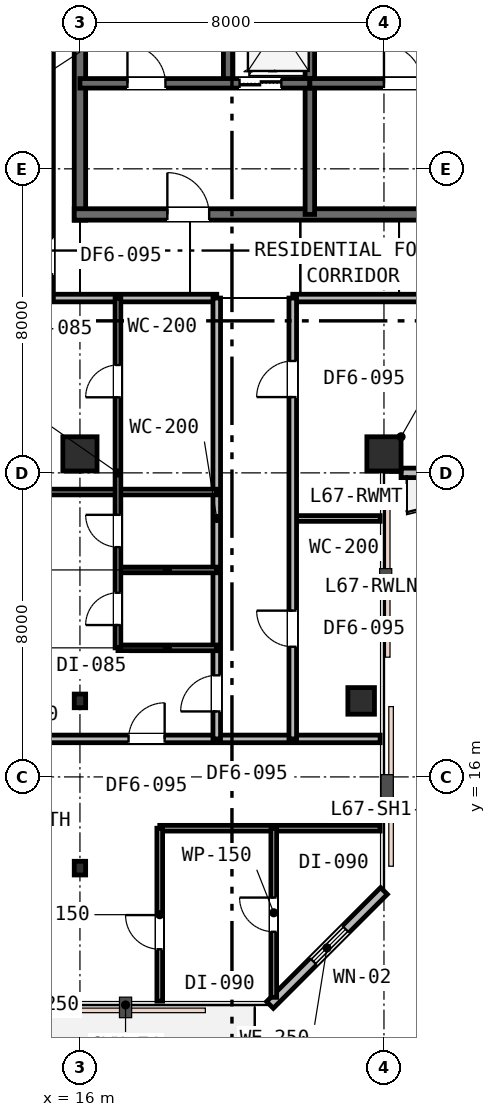
"""IFC4 building model, lengths in metres.
Left out: names, types, materials, properties, quantities, classifications, styles, units other than length and angle.
Written with IfcOpenShell. Run it as: python <this file> out.ifc"""

import sys

from ifc_helpers import new_model, si_unit, direction, frame, frame_2d, origin, origin_2d, place, context, subcontext, project, spatial, rectangle, i_section, extrude, element, fill, save


model = new_model("IFC4")
c1 = context("Model", 3, precision=1e-05, world=origin(), true_north=direction((0.0, 1.0)))
c2 = subcontext(c1, "Body", "Model", "MODEL_VIEW")
j1 = project(units=[si_unit("LENGTHUNIT", "METRE"), si_unit("PLANEANGLEUNIT", "RADIAN")], contexts=[c1])
p1 = place(None, origin())
s1 = spatial("IfcSite", under=j1, at=p1, CompositionType="ELEMENT")
p2 = place(p1, origin())
s2 = spatial("IfcBuilding", under=s1, at=p2, CompositionType="ELEMENT")
p3 = place(p2, frame((0.0, 0.0, 260.2)))
s3 = spatial("IfcBuildingStorey", under=s2, at=p3, CompositionType="ELEMENT", Elevation=260.2)
p4 = place(p3, frame((16.0, 30.65, 0.0), z_axis=(0.0, 0.0, 1.0), x_axis=(0.0, 1.0, 0.0)))
e1 = element("IfcWall", 1, at=p4, inside=s3, PredefinedType="SHEAR", context=c2, shape_type="SweptSolid", body=[
    extrude(rectangle(XDim=12.3, YDim=0.3, at=frame_2d((6.15, 0.0))), origin(), (0.0, 0.0, 1.0), 3.8),
])
p5 = place(p3, frame((15.85, 30.8, 0.0), z_axis=(0.0, 0.0, 1.0), x_axis=(1.0, 0.0, 0.0)))
e2 = element("IfcWall", 2, at=p5, inside=s3, PredefinedType="SHEAR", context=c2, shape_type="SweptSolid", body=[
    extrude(rectangle(XDim=11.2, YDim=0.3, at=frame_2d((5.6, 0.0))), origin(), (0.0, 0.0, 1.0), 3.8),
])
p6 = place(p5, frame((2.45, 0.0, 0.0)))
e3 = element("IfcOpeningElement", 3, at=p6, cuts=e2, PredefinedType="OPENING", context=c2, shape_type="SweptSolid", body=[
    extrude(rectangle(XDim=1.1, YDim=2.15, at=frame_2d((0.55, 1.075))), frame((0.0, 0.16, 0.0), z_axis=(0.0, -1.0, 0.0), x_axis=(1.0, 0.0, 0.0)), (0.0, 0.0, 1.0), 0.32),
])
p7 = place(p3, frame((19.9, 34.25, 0.0), z_axis=(0.0, 0.0, 1.0), x_axis=(0.0, 1.0, 0.0)))
e4 = element("IfcWall", 4, at=p7, inside=s3, PredefinedType="SHEAR", context=c2, shape_type="SweptSolid", body=[
    extrude(rectangle(XDim=8.65, YDim=0.25, at=frame_2d((4.325, 0.0))), origin(), (0.0, 0.0, 1.0), 3.8),
])
p8 = place(p3, frame((22.05, 30.8, 0.0), z_axis=(0.0, 0.0, 1.0), x_axis=(0.0, 1.0, 0.0)))
e5 = element("IfcWall", 5, at=p8, inside=s3, PredefinedType="SHEAR", context=c2, shape_type="SweptSolid", body=[
    extrude(rectangle(XDim=6.45, YDim=0.25, at=frame_2d((3.225, 0.0))), origin(), (0.0, 0.0, 1.0), 3.8),
])
p9 = place(p3, frame((16.0, 34.25, 0.0), z_axis=(0.0, 0.0, 1.0), x_axis=(1.0, 0.0, 0.0)))
e6 = element("IfcWall", 6, at=p9, inside=s3, PredefinedType="SHEAR", context=c2, shape_type="SweptSolid", body=[
    extrude(rectangle(XDim=6.05, YDim=0.25, at=frame_2d((3.025, 0.0))), origin(), (0.0, 0.0, 1.0), 3.8),
])
p10 = place(p9, frame((1.25, 0.0, 0.0)))
e7 = element("IfcOpeningElement", 7, at=p10, cuts=e6, PredefinedType="OPENING", context=c2, shape_type="SweptSolid", body=[
    extrude(rectangle(XDim=1.0, YDim=2.15, at=frame_2d((0.5, 1.075))), frame((0.0, 0.135, 0.0), z_axis=(0.0, -1.0, 0.0), x_axis=(1.0, 0.0, 0.0)), (0.0, 0.0, 1.0), 0.27),
])
p11 = place(p9, frame((4.2, 0.0, 0.0)))
e8 = element("IfcOpeningElement", 8, at=p11, cuts=e6, PredefinedType="OPENING", context=c2, shape_type="SweptSolid", body=[
    extrude(rectangle(XDim=1.1, YDim=2.15, at=frame_2d((0.55, 1.075))), frame((0.0, 0.135, 0.0), z_axis=(0.0, -1.0, 0.0), x_axis=(1.0, 0.0, 0.0)), (0.0, 0.0, 1.0), 0.27),
])
p12 = place(p3, frame((22.05, 34.25, 0.0), z_axis=(0.0, 0.0, 1.0), x_axis=(1.0, 0.0, 0.0)))
e9 = element("IfcWall", 9, at=p12, inside=s3, PredefinedType="SHEAR", context=c2, shape_type="SweptSolid", body=[
    extrude(rectangle(XDim=5.0, YDim=0.25, at=frame_2d((2.5, 0.0))), origin(), (0.0, 0.0, 1.0), 3.8),
])
p13 = place(p12, frame((1.95, 0.0, 0.0)))
e10 = element("IfcOpeningElement", 10, at=p13, cuts=e9, PredefinedType="OPENING", context=c2, shape_type="SweptSolid", body=[
    extrude(rectangle(XDim=1.0, YDim=2.15, at=frame_2d((0.5, 1.075))), frame((0.0, 0.135, 0.0), z_axis=(0.0, -1.0, 0.0), x_axis=(1.0, 0.0, 0.0)), (0.0, 0.0, 1.0), 0.27),
])
for number, where, z_axis, x_axis in (
    (11, (16.0, 24.5, 0.0), (0.0, 0.0, 1.0), (1.0, 0.0, 0.0)),
    (12, (24.0, 24.5, 0.0), (0.0, 0.0, 1.0), (1.0, 0.0, 0.0)),
):
    element("IfcColumn", number, at=place(p3, frame(where, z_axis=z_axis, x_axis=x_axis)), inside=s3, PredefinedType="COLUMN", context=c2, shape_type="SweptSolid", body=[
        extrude(rectangle(XDim=0.9, YDim=0.9, at=origin_2d()), origin(), (0.0, 0.0, 1.0), 3.8),
    ])
p14 = place(p3, frame((23.4, 18.0, 0.0), z_axis=(0.0, 0.0, 1.0), x_axis=(1.0, 0.0, 0.0)))
e13 = element("IfcColumn", 13, at=p14, inside=s3, PredefinedType="COLUMN", context=c2, shape_type="SweptSolid", body=[
    extrude(rectangle(XDim=0.7, YDim=0.7, at=origin_2d()), origin(), (0.0, 0.0, 1.0), 3.8),
])
for number, where, z_axis, x_axis in (
    (14, (16.0, 13.6, 0.0), (0.0, 0.0, 1.0), (1.0, 0.0, 0.0)),
    (15, (16.0, 18.0, 0.0), (0.0, 0.0, 1.0), (1.0, 0.0, 0.0)),
):
    element("IfcColumn", number, at=place(p3, frame(where, z_axis=z_axis, x_axis=x_axis)), inside=s3, PredefinedType="COLUMN", context=c2, shape_type="SweptSolid", body=[
        extrude(i_section(OverallWidth=0.3, OverallDepth=0.36, WebThickness=0.013, FlangeThickness=0.022, FilletRadius=0.027, at=origin_2d()), origin(), (0.0, 0.0, 1.0), 3.8),
    ])
p15 = place(p3, frame((21.0, 10.0, 0.0), z_axis=(0.0, 0.0, 1.0), x_axis=(0.707106781187, 0.707106781187, 0.0)))
e16 = element("IfcWall", 16, at=p15, inside=s3, PredefinedType="STANDARD", context=c2, shape_type="SweptSolid", body=[
    extrude(rectangle(XDim=4.243, YDim=0.25, at=frame_2d((2.121, 0.0))), origin(), (0.0, 0.0, 1.0), 3.53),
])
p16 = place(p15, frame((1.617, 0.0, 0.85)))
e17 = element("IfcOpeningElement", 17, at=p16, cuts=e16, PredefinedType="OPENING", context=c2, shape_type="SweptSolid", body=[
    extrude(rectangle(XDim=1.2, YDim=1.6, at=frame_2d((0.6, 0.8))), frame((0.0, 0.135, 0.0), z_axis=(0.0, -1.0, 0.0), x_axis=(1.0, 0.0, 0.0)), (0.0, 0.0, 1.0), 0.27),
])
p17 = place(p3, frame((24.45, 24.0, 0.0), z_axis=(0.0, 0.0, 1.0), x_axis=(1.0, 0.0, 0.0)))
e18 = element("IfcWall", 18, at=p17, inside=s3, PredefinedType="STANDARD", context=c2, shape_type="SweptSolid", body=[
    extrude(rectangle(XDim=0.95, YDim=0.25, at=frame_2d((0.475, 0.0))), origin(), (0.0, 0.0, 1.0), 3.27),
])
p18 = place(p3, frame((15.2, 28.6, 0.0), z_axis=(0.0, 0.0, 1.0), x_axis=(1.0, 0.0, 0.0)))
e19 = element("IfcWall", 19, at=p18, inside=s3, PredefinedType="PARTITIONING", context=c2, shape_type="SweptSolid", body=[
    extrude(rectangle(XDim=4.4, YDim=0.2, at=frame_2d((2.2, 0.0))), origin(), (0.0, 0.0, 1.0), 3.16),
])
p19 = place(p3, frame((21.6, 28.6, 0.0), z_axis=(0.0, 0.0, 1.0), x_axis=(1.0, 0.0, 0.0)))
e20 = element("IfcWall", 20, at=p19, inside=s3, PredefinedType="PARTITIONING", context=c2, shape_type="SweptSolid", body=[
    extrude(rectangle(XDim=24.3, YDim=0.2, at=frame_2d((12.15, 0.0))), origin(), (0.0, 0.0, 1.0), 3.16),
])
p20 = place(p19, frame((5.925, 0.0, 0.0)))
e21 = element("IfcOpeningElement", 21, at=p20, cuts=e20, PredefinedType="OPENING", context=c2, shape_type="SweptSolid", body=[
    extrude(rectangle(XDim=0.95, YDim=2.15, at=frame_2d((0.475, 1.075))), frame((0.0, 0.11, 0.0), z_axis=(0.0, -1.0, 0.0), x_axis=(1.0, 0.0, 0.0)), (0.0, 0.0, 1.0), 0.22),
])
p21 = place(p19, frame((17.525, 0.0, 0.0)))
e22 = element("IfcOpeningElement", 22, at=p21, cuts=e20, PredefinedType="OPENING", context=c2, shape_type="SweptSolid", body=[
    extrude(rectangle(XDim=0.95, YDim=2.15, at=frame_2d((0.475, 1.075))), frame((0.0, 0.11, 0.0), z_axis=(0.0, -1.0, 0.0), x_axis=(1.0, 0.0, 0.0)), (0.0, 0.0, 1.0), 0.22),
])
p22 = place(p3, frame((15.2, 28.6, 0.0), z_axis=(0.0, 0.0, 1.0), x_axis=(0.0, 1.0, 0.0)))
e23 = element("IfcWall", 23, at=p22, inside=s3, PredefinedType="PARTITIONING", context=c2, shape_type="SweptSolid", body=[
    extrude(rectangle(XDim=14.3, YDim=0.2, at=frame_2d((7.15, 0.0))), origin(), (0.0, 0.0, 1.0), 3.53),
])
p23 = place(p22, frame((0.625, 0.0, 0.0)))
e24 = element("IfcOpeningElement", 24, at=p23, cuts=e23, PredefinedType="OPENING", context=c2, shape_type="SweptSolid", body=[
    extrude(rectangle(XDim=0.95, YDim=2.15, at=frame_2d((0.475, 1.075))), frame((0.0, 0.11, 0.0), z_axis=(0.0, -1.0, 0.0), x_axis=(1.0, 0.0, 0.0)), (0.0, 0.0, 1.0), 0.22),
])
p24 = place(p3, frame((5.1, 17.0, 0.0), z_axis=(0.0, 0.0, 1.0), x_axis=(1.0, 0.0, 0.0)))
e25 = element("IfcWall", 25, at=p24, inside=s3, PredefinedType="PARTITIONING", context=c2, shape_type="SweptSolid", body=[
    extrude(rectangle(XDim=18.8, YDim=0.2, at=frame_2d((9.4, 0.0))), origin(), (0.0, 0.0, 1.0), 3.16),
])
p25 = place(p24, frame((12.179, 0.0, 0.0)))
e26 = element("IfcOpeningElement", 26, at=p25, cuts=e25, PredefinedType="OPENING", context=c2, shape_type="SweptSolid", body=[
    extrude(rectangle(XDim=0.95, YDim=2.15, at=frame_2d((0.475, 1.075))), frame((0.0, 0.11, 0.0), z_axis=(0.0, -1.0, 0.0), x_axis=(1.0, 0.0, 0.0)), (0.0, 0.0, 1.0), 0.22),
])
p26 = place(p3, frame((19.6, 17.0, 0.0), z_axis=(0.0, 0.0, 1.0), x_axis=(0.0, 1.0, 0.0)))
e27 = element("IfcWall", 27, at=p26, inside=s3, PredefinedType="PARTITIONING", context=c2, shape_type="SweptSolid", body=[
    extrude(rectangle(XDim=11.6, YDim=0.2, at=frame_2d((5.8, 0.0))), origin(), (0.0, 0.0, 1.0), 3.16),
])
p27 = place(p26, frame((0.723, 0.0, 0.0)))
e28 = element("IfcOpeningElement", 28, at=p27, cuts=e27, PredefinedType="OPENING", context=c2, shape_type="SweptSolid", body=[
    extrude(rectangle(XDim=0.95, YDim=2.15, at=frame_2d((0.475, 1.075))), frame((0.0, 0.11, 0.0), z_axis=(0.0, -1.0, 0.0), x_axis=(1.0, 0.0, 0.0)), (0.0, 0.0, 1.0), 0.22),
])
for number, where, z_axis, x_axis in (
    (29, (17.0, 19.396, 0.0), (0.0, 0.0, 1.0), (1.0, 0.0, 0.0)),
    (30, (17.0, 21.446, 0.0), (0.0, 0.0, 1.0), (1.0, 0.0, 0.0)),
):
    element("IfcWall", number, at=place(p3, frame(where, z_axis=z_axis, x_axis=x_axis)), inside=s3, PredefinedType="PARTITIONING", context=c2, shape_type="SweptSolid", body=[
        extrude(rectangle(XDim=2.6, YDim=0.15, at=frame_2d((1.3, 0.0))), origin(), (0.0, 0.0, 1.0), 3.53),
    ])
p28 = place(p3, frame((5.1, 23.496, 0.0), z_axis=(0.0, 0.0, 1.0), x_axis=(1.0, 0.0, 0.0)))
e31 = element("IfcWall", 31, at=p28, inside=s3, PredefinedType="PARTITIONING", context=c2, shape_type="SweptSolid", body=[
    extrude(rectangle(XDim=14.5, YDim=0.15, at=frame_2d((7.25, 0.0))), origin(), (0.0, 0.0, 1.0), 3.16),
])
p29 = place(p28, frame((5.5, 0.0, 0.0)))
e32 = element("IfcOpeningElement", 32, at=p29, cuts=e31, PredefinedType="OPENING", context=c2, shape_type="SweptSolid", body=[
    extrude(rectangle(XDim=0.9, YDim=2.15, at=frame_2d((0.45, 1.075))), frame((0.0, 0.085, 0.0), z_axis=(0.0, -1.0, 0.0), x_axis=(1.0, 0.0, 0.0)), (0.0, 0.0, 1.0), 0.17),
])
p30 = place(p3, frame((17.0, 19.396, 0.0), z_axis=(0.0, 0.0, 1.0), x_axis=(0.0, 1.0, 0.0)))
e33 = element("IfcWall", 33, at=p30, inside=s3, PredefinedType="PARTITIONING", context=c2, shape_type="SweptSolid", body=[
    extrude(rectangle(XDim=9.204, YDim=0.15, at=frame_2d((4.602, 0.0))), origin(), (0.0, 0.0, 1.0), 3.16),
])
p31 = place(p30, frame((0.6, 0.0, 0.0)))
e34 = element("IfcOpeningElement", 34, at=p31, cuts=e33, PredefinedType="OPENING", context=c2, shape_type="SweptSolid", body=[
    extrude(rectangle(XDim=0.85, YDim=2.15, at=frame_2d((0.425, 1.075))), frame((0.0, 0.085, 0.0), z_axis=(0.0, -1.0, 0.0), x_axis=(1.0, 0.0, 0.0)), (0.0, 0.0, 1.0), 0.17),
])
p32 = place(p30, frame((2.65, 0.0, 0.0)))
e35 = element("IfcOpeningElement", 35, at=p32, cuts=e33, PredefinedType="OPENING", context=c2, shape_type="SweptSolid", body=[
    extrude(rectangle(XDim=0.85, YDim=2.15, at=frame_2d((0.425, 1.075))), frame((0.0, 0.085, 0.0), z_axis=(0.0, -1.0, 0.0), x_axis=(1.0, 0.0, 0.0)), (0.0, 0.0, 1.0), 0.17),
])
p33 = place(p30, frame((6.593, 0.0, 0.0)))
e36 = element("IfcOpeningElement", 36, at=p33, cuts=e33, PredefinedType="OPENING", context=c2, shape_type="SweptSolid", body=[
    extrude(rectangle(XDim=0.85, YDim=2.15, at=frame_2d((0.425, 1.075))), frame((0.0, 0.085, 0.0), z_axis=(0.0, -1.0, 0.0), x_axis=(1.0, 0.0, 0.0)), (0.0, 0.0, 1.0), 0.17),
])
p34 = place(p3, frame((21.6, 22.8, 0.0), z_axis=(0.0, 0.0, 1.0), x_axis=(1.0, 0.0, 0.0)))
e37 = element("IfcWall", 37, at=p34, inside=s3, PredefinedType="PARTITIONING", context=c2, shape_type="SweptSolid", body=[
    extrude(rectangle(XDim=2.3, YDim=0.15, at=frame_2d((1.15, 0.0))), origin(), (0.0, 0.0, 1.0), 3.53),
])
p35 = place(p3, frame((21.6, 17.0, 0.0), z_axis=(0.0, 0.0, 1.0), x_axis=(0.0, 1.0, 0.0)))
e38 = element("IfcWall", 38, at=p35, inside=s3, PredefinedType="PARTITIONING", context=c2, shape_type="SweptSolid", body=[
    extrude(rectangle(XDim=11.6, YDim=0.2, at=frame_2d((5.8, 0.0))), origin(), (0.0, 0.0, 1.0), 3.16),
])
p36 = place(p35, frame((8.994, 0.0, 0.0)))
e39 = element("IfcOpeningElement", 39, at=p36, cuts=e38, PredefinedType="OPENING", context=c2, shape_type="SweptSolid", body=[
    extrude(rectangle(XDim=0.95, YDim=2.15, at=frame_2d((0.475, 1.075))), frame((0.0, 0.11, 0.0), z_axis=(0.0, -1.0, 0.0), x_axis=(1.0, 0.0, 0.0)), (0.0, 0.0, 1.0), 0.22),
])
p37 = place(p35, frame((2.425, 0.0, 0.0)))
e40 = element("IfcOpeningElement", 40, at=p37, cuts=e38, PredefinedType="OPENING", context=c2, shape_type="SweptSolid", body=[
    extrude(rectangle(XDim=0.95, YDim=2.15, at=frame_2d((0.475, 1.075))), frame((0.0, 0.11, 0.0), z_axis=(0.0, -1.0, 0.0), x_axis=(1.0, 0.0, 0.0)), (0.0, 0.0, 1.0), 0.22),
])
p38 = place(p3, frame((18.1, 14.65, 0.0), z_axis=(0.0, 0.0, 1.0), x_axis=(1.0, 0.0, 0.0)))
e41 = element("IfcWall", 41, at=p38, inside=s3, PredefinedType="PARTITIONING", context=c2, shape_type="SweptSolid", body=[
    extrude(rectangle(XDim=5.8, YDim=0.15, at=frame_2d((2.9, 0.0))), origin(), (0.0, 0.0, 1.0), 3.53),
])
p39 = place(p3, frame((21.1, 10.2, 0.0), z_axis=(0.0, 0.0, 1.0), x_axis=(0.0, 1.0, 0.0)))
e42 = element("IfcWall", 42, at=p39, inside=s3, PredefinedType="PARTITIONING", context=c2, shape_type="SweptSolid", body=[
    extrude(rectangle(XDim=4.45, YDim=0.15, at=frame_2d((2.225, 0.0))), origin(), (0.0, 0.0, 1.0), 3.53),
])
p40 = place(p39, frame((1.725, 0.0, 0.0)))
e43 = element("IfcOpeningElement", 43, at=p40, cuts=e42, PredefinedType="OPENING", context=c2, shape_type="SweptSolid", body=[
    extrude(rectangle(XDim=0.9, YDim=2.15, at=frame_2d((0.45, 1.075))), frame((0.0, 0.085, 0.0), z_axis=(0.0, -1.0, 0.0), x_axis=(1.0, 0.0, 0.0)), (0.0, 0.0, 1.0), 0.17),
])
p41 = place(p3, frame((18.1, 10.1, 0.0), z_axis=(0.0, 0.0, 1.0), x_axis=(0.0, 1.0, 0.0)))
e44 = element("IfcWall", 44, at=p41, inside=s3, PredefinedType="PARTITIONING", context=c2, shape_type="SweptSolid", body=[
    extrude(rectangle(XDim=4.55, YDim=0.15, at=frame_2d((2.275, 0.0))), origin(), (0.0, 0.0, 1.0), 3.53),
])
p42 = place(p41, frame((1.365, 0.0, 0.0)))
e45 = element("IfcOpeningElement", 45, at=p42, cuts=e44, PredefinedType="OPENING", context=c2, shape_type="SweptSolid", body=[
    extrude(rectangle(XDim=0.9, YDim=2.15, at=frame_2d((0.45, 1.075))), frame((0.0, 0.085, 0.0), z_axis=(0.0, -1.0, 0.0), x_axis=(1.0, 0.0, 0.0)), (0.0, 0.0, 1.0), 0.17),
])
p43 = place(p16, origin())
e46 = element("IfcWindow", 46, at=p43, inside=s3, PartitioningType="SINGLE_PANEL", PredefinedType="WINDOW", context=c2, shape_type="SweptSolid", body=[
    extrude(rectangle(XDim=1.2, YDim=1.6, at=frame_2d((0.6, 0.8))), frame((0.0, 0.03, 0.0), z_axis=(0.0, -1.0, 0.0), x_axis=(1.0, 0.0, 0.0)), (0.0, 0.0, 1.0), 0.06),
])
fill(e17, e46)
p44 = place(p10, origin())
e47 = element("IfcDoor", 47, at=p44, inside=s3, OperationType="SINGLE_SWING_LEFT", PredefinedType="DOOR", context=c2, shape_type="SweptSolid", body=[
    extrude(rectangle(XDim=1.0, YDim=2.15, at=frame_2d((0.5, 1.075))), frame((0.0, 0.025, 0.0), z_axis=(0.0, -1.0, 0.0), x_axis=(1.0, 0.0, 0.0)), (0.0, 0.0, 1.0), 0.05),
])
fill(e7, e47)
p45 = place(p6, origin())
e48 = element("IfcDoor", 48, at=p45, inside=s3, OperationType="SINGLE_SWING_LEFT", PredefinedType="DOOR", context=c2, shape_type="SweptSolid", body=[
    extrude(rectangle(XDim=1.1, YDim=2.15, at=frame_2d((0.55, 1.075))), frame((0.0, 0.025, 0.0), z_axis=(0.0, -1.0, 0.0), x_axis=(1.0, 0.0, 0.0)), (0.0, 0.0, 1.0), 0.05),
])
fill(e3, e48)
p46 = place(p13, origin())
e49 = element("IfcDoor", 49, at=p46, inside=s3, OperationType="SINGLE_SWING_LEFT", PredefinedType="DOOR", context=c2, shape_type="SweptSolid", body=[
    extrude(rectangle(XDim=1.0, YDim=2.15, at=frame_2d((0.5, 1.075))), frame((0.0, 0.025, 0.0), z_axis=(0.0, -1.0, 0.0), x_axis=(1.0, 0.0, 0.0)), (0.0, 0.0, 1.0), 0.05),
])
fill(e10, e49)
p47 = place(p27, origin())
e50 = element("IfcDoor", 50, at=p47, inside=s3, OperationType="SINGLE_SWING_LEFT", PredefinedType="DOOR", context=c2, shape_type="SweptSolid", body=[
    extrude(rectangle(XDim=0.95, YDim=2.15, at=frame_2d((0.475, 1.075))), frame((0.0, 0.025, 0.0), z_axis=(0.0, -1.0, 0.0), x_axis=(1.0, 0.0, 0.0)), (0.0, 0.0, 1.0), 0.05),
])
fill(e28, e50)
p48 = place(p31, origin())
e51 = element("IfcDoor", 51, at=p48, inside=s3, OperationType="SINGLE_SWING_LEFT", PredefinedType="DOOR", context=c2, shape_type="SweptSolid", body=[
    extrude(rectangle(XDim=0.85, YDim=2.15, at=frame_2d((0.425, 1.075))), frame((0.0, 0.025, 0.0), z_axis=(0.0, -1.0, 0.0), x_axis=(1.0, 0.0, 0.0)), (0.0, 0.0, 1.0), 0.05),
])
fill(e34, e51)
p49 = place(p32, origin())
e52 = element("IfcDoor", 52, at=p49, inside=s3, OperationType="SINGLE_SWING_RIGHT", PredefinedType="DOOR", context=c2, shape_type="SweptSolid", body=[
    extrude(rectangle(XDim=0.85, YDim=2.15, at=frame_2d((0.425, 1.075))), frame((0.0, 0.025, 0.0), z_axis=(0.0, -1.0, 0.0), x_axis=(1.0, 0.0, 0.0)), (0.0, 0.0, 1.0), 0.05),
])
fill(e35, e52)
p50 = place(p33, origin())
e53 = element("IfcDoor", 53, at=p50, inside=s3, OperationType="SINGLE_SWING_LEFT", PredefinedType="DOOR", context=c2, shape_type="SweptSolid", body=[
    extrude(rectangle(XDim=0.85, YDim=2.15, at=frame_2d((0.425, 1.075))), frame((0.0, 0.025, 0.0), z_axis=(0.0, -1.0, 0.0), x_axis=(1.0, 0.0, 0.0)), (0.0, 0.0, 1.0), 0.05),
])
fill(e36, e53)
p51 = place(p36, origin())
e54 = element("IfcDoor", 54, at=p51, inside=s3, OperationType="SINGLE_SWING_LEFT", PredefinedType="DOOR", context=c2, shape_type="SweptSolid", body=[
    extrude(rectangle(XDim=0.95, YDim=2.15, at=frame_2d((0.475, 1.075))), frame((0.0, 0.025, 0.0), z_axis=(0.0, -1.0, 0.0), x_axis=(1.0, 0.0, 0.0)), (0.0, 0.0, 1.0), 0.05),
])
fill(e39, e54)
p52 = place(p37, origin())
e55 = element("IfcDoor", 55, at=p52, inside=s3, OperationType="SINGLE_SWING_RIGHT", PredefinedType="DOOR", context=c2, shape_type="SweptSolid", body=[
    extrude(rectangle(XDim=0.95, YDim=2.15, at=frame_2d((0.475, 1.075))), frame((0.0, 0.025, 0.0), z_axis=(0.0, -1.0, 0.0), x_axis=(1.0, 0.0, 0.0)), (0.0, 0.0, 1.0), 0.05),
])
fill(e40, e55)
p53 = place(p25, origin())
e56 = element("IfcDoor", 56, at=p53, inside=s3, OperationType="SINGLE_SWING_RIGHT", PredefinedType="DOOR", context=c2, shape_type="SweptSolid", body=[
    extrude(rectangle(XDim=0.95, YDim=2.15, at=frame_2d((0.475, 1.075))), frame((0.0, 0.025, 0.0), z_axis=(0.0, -1.0, 0.0), x_axis=(1.0, 0.0, 0.0)), (0.0, 0.0, 1.0), 0.05),
])
fill(e26, e56)
p54 = place(p40, origin())
e57 = element("IfcDoor", 57, at=p54, inside=s3, OperationType="SINGLE_SWING_RIGHT", PredefinedType="DOOR", context=c2, shape_type="SweptSolid", body=[
    extrude(rectangle(XDim=0.9, YDim=2.15, at=frame_2d((0.45, 1.075))), frame((0.0, 0.025, 0.0), z_axis=(0.0, -1.0, 0.0), x_axis=(1.0, 0.0, 0.0)), (0.0, 0.0, 1.0), 0.05),
])
fill(e43, e57)
p55 = place(p42, origin())
e58 = element("IfcDoor", 58, at=p55, inside=s3, OperationType="SINGLE_SWING_RIGHT", PredefinedType="DOOR", context=c2, shape_type="SweptSolid", body=[
    extrude(rectangle(XDim=0.9, YDim=2.15, at=frame_2d((0.45, 1.075))), frame((0.0, 0.025, 0.0), z_axis=(0.0, -1.0, 0.0), x_axis=(1.0, 0.0, 0.0)), (0.0, 0.0, 1.0), 0.05),
])
fill(e45, e58)
p56 = place(p11, origin())
e59 = element("IfcDoor", 59, at=p56, inside=s3, OperationType="DOUBLE_DOOR_SLIDING", PredefinedType="DOOR", context=c2, shape_type="SweptSolid", body=[
    extrude(rectangle(XDim=1.1, YDim=2.15, at=frame_2d((0.55, 1.075))), frame((0.0, 0.025, 0.0), z_axis=(0.0, -1.0, 0.0), x_axis=(1.0, 0.0, 0.0)), (0.0, 0.0, 1.0), 0.05),
])
fill(e8, e59)
save(model, sys.argv[1])
